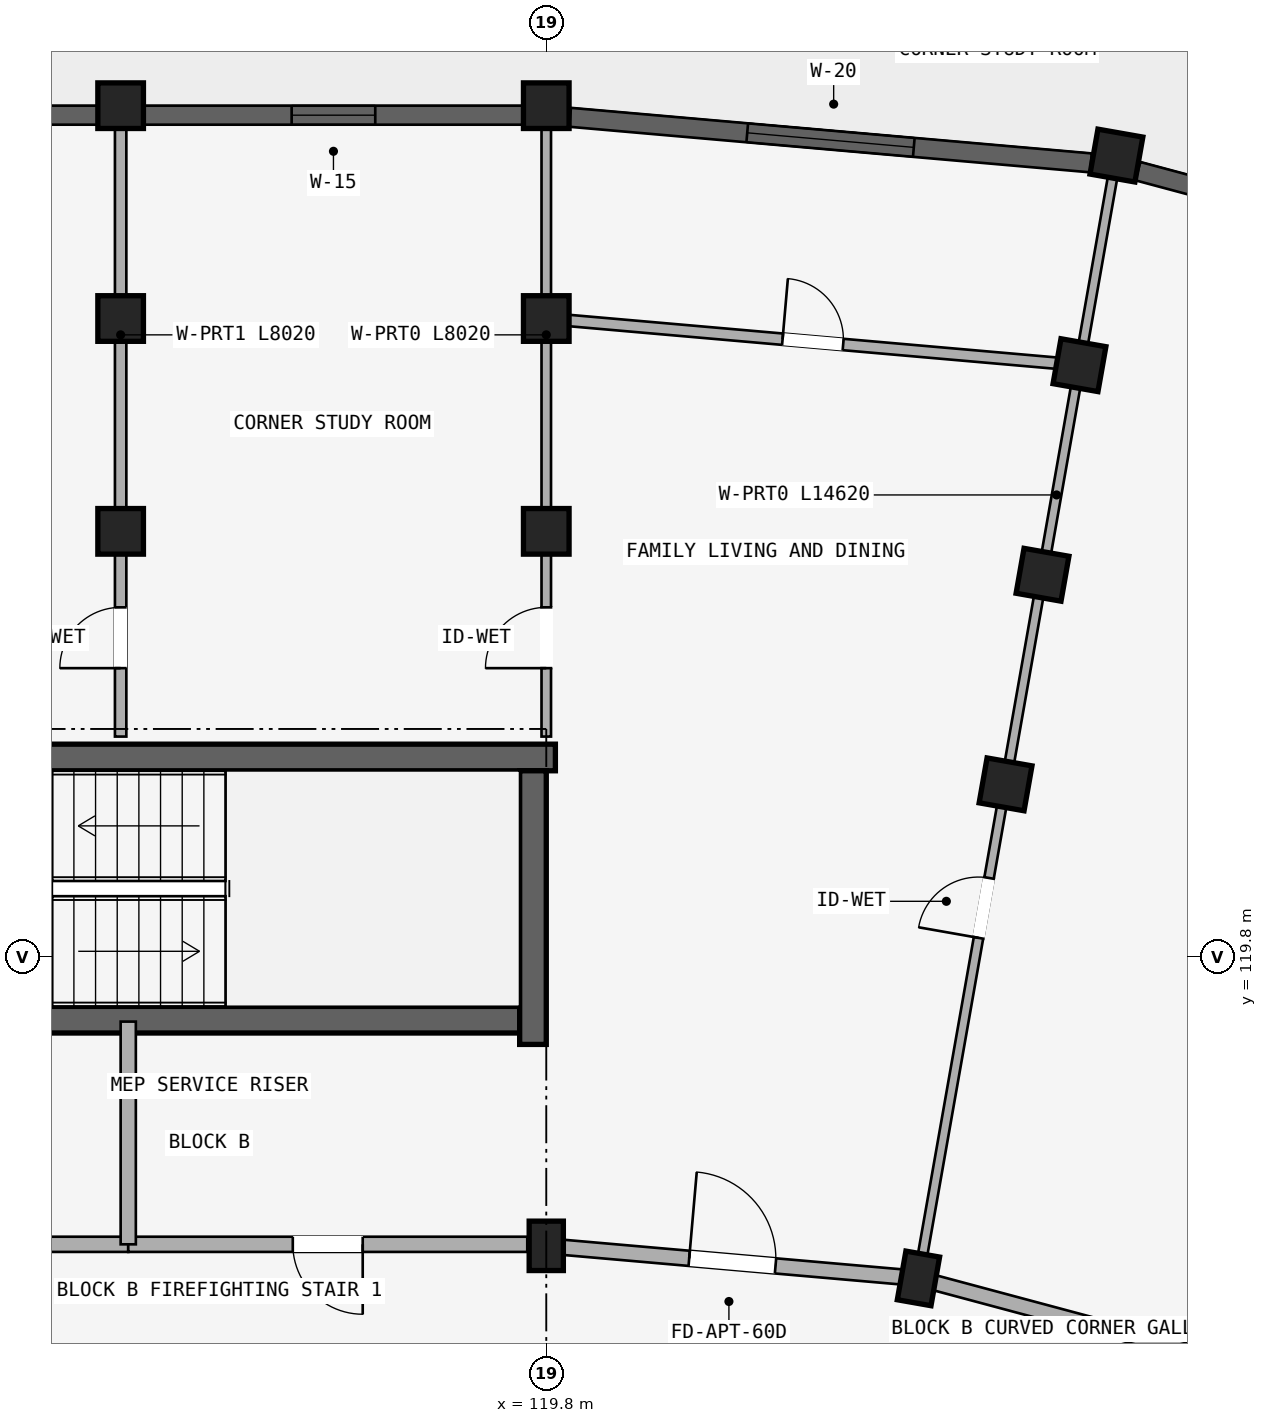
"""IFC4 building model, lengths in metres.
Left out: names, types, materials, properties, quantities, classifications, styles, units other than length and angle.
Written with IfcOpenShell. Run it as: python <this file> out.ifc"""

import sys

from ifc_helpers import new_model, si_unit, direction, frame, frame_2d, origin, origin_2d, place, context, subcontext, project, spatial, rectangle, extrude, element, fill, save


model = new_model("IFC4")
c1 = context("Model", 3, precision=1e-05, world=origin(), true_north=direction((0.0, 1.0)))
c2 = subcontext(c1, "Body", "Model", "MODEL_VIEW")
j1 = project(units=[si_unit("LENGTHUNIT", "METRE"), si_unit("PLANEANGLEUNIT", "RADIAN")], contexts=[c1])
p1 = place(None, origin())
s1 = spatial("IfcSite", under=j1, at=p1, CompositionType="ELEMENT")
p2 = place(p1, origin())
s2 = spatial("IfcBuilding", under=s1, at=p2, CompositionType="ELEMENT")
p3 = place(p2, frame((0.0, 0.0, 30.75)))
s3 = spatial("IfcBuildingStorey", under=s2, at=p3, CompositionType="ELEMENT", Elevation=30.75)
p4 = place(p3, frame((119.92, 122.425, 0.0), z_axis=(0.0, 0.0, 1.0), x_axis=(-1.0, 0.0, 0.0)))
e1 = element("IfcWall", 1, at=p4, inside=s3, PredefinedType="SHEAR", context=c2, shape_type="SweptSolid", body=[
    extrude(rectangle(XDim=8.545, YDim=0.35, at=frame_2d((4.272, 0.0))), origin(), (0.0, 0.0, 1.0), 2.93),
])
p5 = place(p3, frame((119.45, 118.975, 0.0), z_axis=(0.0, 0.0, 1.0), x_axis=(-1.0, 0.0, 0.0)))
e2 = element("IfcWall", 2, at=p5, inside=s3, PredefinedType="SHEAR", context=c2, shape_type="SweptSolid", body=[
    extrude(rectangle(XDim=8.075, YDim=0.35, at=frame_2d((4.038, 0.0))), origin(), (0.0, 0.0, 1.0), 2.93),
])
p6 = place(p5, frame((6.38, 0.0, 0.0)))
e3 = element("IfcOpeningElement", 3, at=p6, cuts=e2, PredefinedType="OPENING", context=c2, shape_type="SweptSolid", body=[
    extrude(rectangle(XDim=1.24, YDim=2.15, at=frame_2d((0.62, 1.075))), frame((0.0, 0.185, 0.0), z_axis=(0.0, -1.0, 0.0), x_axis=(1.0, 0.0, 0.0)), (0.0, 0.0, 1.0), 0.37),
])
p7 = place(p3, frame((119.625, 118.65, 0.0), z_axis=(0.0, 0.0, 1.0), x_axis=(0.0, 1.0, 0.0)))
e4 = element("IfcWall", 4, at=p7, inside=s3, PredefinedType="SHEAR", context=c2, shape_type="SweptSolid", body=[
    extrude(rectangle(XDim=3.6, YDim=0.35, at=frame_2d((1.8, 0.0))), origin(), (0.0, 0.0, 1.0), 2.93),
])
p8 = place(p3, frame((119.8, 116.0, 0.0), z_axis=(0.0, 0.0, 1.0), x_axis=(1.0, 0.0, 0.0)))
e5 = element("IfcColumn", 5, at=p8, inside=s3, PredefinedType="COLUMN", context=c2, shape_type="SweptSolid", body=[
    extrude(rectangle(XDim=0.45, YDim=0.65, at=origin_2d()), origin(), (0.0, 0.0, 1.0), 2.93),
])
for number, where, z_axis, x_axis in (
    (6, (119.8, 125.4, 0.0), (0.0, 0.0, 1.0), (1.0, 0.0, 0.0)),
    (7, (119.8, 128.2, 0.0), (0.0, 0.0, 1.0), (1.0, 0.0, 0.0)),
):
    element("IfcColumn", number, at=place(p3, frame(where, z_axis=z_axis, x_axis=x_axis)), inside=s3, PredefinedType="COLUMN", context=c2, shape_type="SweptSolid", body=[
        extrude(rectangle(XDim=0.6, YDim=0.6, at=origin_2d()), origin(), (0.0, 0.0, 1.0), 2.93),
    ])
p9 = place(p3, frame((119.8, 131.0, 0.0), z_axis=(0.0, 0.0, 1.0), x_axis=(1.0, 0.0, 0.0)))
e8 = element("IfcColumn", 8, at=p9, inside=s3, PredefinedType="COLUMN", context=c2, shape_type="SweptSolid", body=[
    extrude(rectangle(XDim=0.6, YDim=0.6, at=origin_2d()), origin(), (0.0, 0.0, 1.0), 2.97),
])
p10 = place(p3, frame((124.697, 115.572, 0.0), z_axis=(0.0, 0.0, 1.0), x_axis=(-0.984807753012, 0.173648177667, 0.0)))
e9 = element("IfcColumn", 9, at=p10, inside=s3, PredefinedType="COLUMN", context=c2, shape_type="SweptSolid", body=[
    extrude(rectangle(XDim=0.45, YDim=0.65, at=origin_2d()), origin(), (0.0, 0.0, 1.0), 2.93),
])
for number, where, z_axis, x_axis in (
    (10, (125.843, 122.071, 0.0), (0.0, 0.0, 1.0), (-0.985, 0.174, 0.0)),
    (11, (126.329, 124.829, 0.0), (0.0, 0.0, 1.0), (-0.985, 0.174, 0.0)),
    (12, (126.815, 127.586, 0.0), (0.0, 0.0, 1.0), (-0.985, 0.174, 0.0)),
):
    element("IfcColumn", number, at=place(p3, frame(where, z_axis=z_axis, x_axis=x_axis)), inside=s3, PredefinedType="COLUMN", context=c2, shape_type="SweptSolid", body=[
        extrude(rectangle(XDim=0.6, YDim=0.6, at=origin_2d()), origin(), (0.0, 0.0, 1.0), 2.93),
    ])
p11 = place(p3, frame((127.302, 130.344, 0.0), z_axis=(0.0, 0.0, 1.0), x_axis=(-0.984807753012, 0.173648177667, 0.0)))
e13 = element("IfcColumn", 13, at=p11, inside=s3, PredefinedType="COLUMN", context=c2, shape_type="SweptSolid", body=[
    extrude(rectangle(XDim=0.6, YDim=0.6, at=origin_2d()), origin(), (0.0, 0.0, 1.0), 2.97),
])
for number, where, z_axis, x_axis in (
    (14, (114.2, 125.4, 0.0), (0.0, 0.0, 1.0), (1.0, 0.0, 0.0)),
    (15, (114.2, 128.2, 0.0), (0.0, 0.0, 1.0), (1.0, 0.0, 0.0)),
):
    element("IfcColumn", number, at=place(p3, frame(where, z_axis=z_axis, x_axis=x_axis)), inside=s3, PredefinedType="COLUMN", context=c2, shape_type="SweptSolid", body=[
        extrude(rectangle(XDim=0.6, YDim=0.6, at=origin_2d()), origin(), (0.0, 0.0, 1.0), 2.93),
    ])
p12 = place(p3, frame((114.2, 131.0, 0.0), z_axis=(0.0, 0.0, 1.0), x_axis=(1.0, 0.0, 0.0)))
e16 = element("IfcColumn", 16, at=p12, inside=s3, PredefinedType="COLUMN", context=c2, shape_type="SweptSolid", body=[
    extrude(rectangle(XDim=0.6, YDim=0.6, at=origin_2d()), origin(), (0.0, 0.0, 1.0), 2.97),
])
p13 = place(p3, frame((114.3, 116.02, 0.0), z_axis=(0.0, 0.0, 1.0), x_axis=(-1.0, 0.0, 0.0)))
e17 = element("IfcWall", 17, at=p13, inside=s3, PredefinedType="STANDARD", context=c2, shape_type="SweptSolid", body=[
    extrude(rectangle(XDim=5.65, YDim=0.2, at=frame_2d((2.825, 0.0))), origin(), (0.0, 0.0, 1.0), 2.372),
])
p14 = place(p13, frame((1.923, 0.0, 0.0)))
e18 = element("IfcOpeningElement", 18, at=p14, cuts=e17, PredefinedType="OPENING", context=c2, shape_type="SweptSolid", body=[
    extrude(rectangle(XDim=1.24, YDim=2.15, at=frame_2d((0.62, 1.075))), frame((0.0, 0.11, 0.0), z_axis=(0.0, -1.0, 0.0), x_axis=(1.0, 0.0, 0.0)), (0.0, 0.0, 1.0), 0.22),
])
p15 = place(p3, frame((119.55, 116.02, 0.0), z_axis=(0.0, 0.0, 1.0), x_axis=(-1.0, 0.0, 0.0)))
e19 = element("IfcWall", 19, at=p15, inside=s3, PredefinedType="STANDARD", context=c2, shape_type="SweptSolid", body=[
    extrude(rectangle(XDim=5.25, YDim=0.2, at=frame_2d((2.625, 0.0))), origin(), (0.0, 0.0, 1.0), 2.372),
])
p16 = place(p15, frame((2.165, 0.0, 0.0)))
e20 = element("IfcOpeningElement", 20, at=p16, cuts=e19, PredefinedType="OPENING", context=c2, shape_type="SweptSolid", body=[
    extrude(rectangle(XDim=0.92, YDim=2.1, at=frame_2d((0.46, 1.05))), frame((0.0, 0.11, 0.0), z_axis=(0.0, -1.0, 0.0), x_axis=(1.0, 0.0, 0.0)), (0.0, 0.0, 1.0), 0.22),
])
p17 = place(p3, frame((114.3, 116.02, 0.0), z_axis=(0.0, 0.0, 1.0), x_axis=(0.0, 1.0, 0.0)))
e21 = element("IfcWall", 21, at=p17, inside=s3, PredefinedType="STANDARD", context=c2, shape_type="SweptSolid", body=[
    extrude(rectangle(XDim=2.93, YDim=0.2, at=frame_2d((1.465, 0.0))), origin(), (0.0, 0.0, 1.0), 2.372),
])
p18 = place(p3, frame((114.2, 122.7, 0.0), z_axis=(0.0, 0.0, 1.0), x_axis=(0.0, 1.0, 0.0)))
e22 = element("IfcWall", 22, at=p18, inside=s3, PredefinedType="PARTITIONING", context=c2, shape_type="SweptSolid", body=[
    extrude(rectangle(XDim=8.02, YDim=0.15, at=frame_2d((4.01, 0.0))), origin(), (0.0, 0.0, 1.0), 2.372),
])
p19 = place(p18, frame((0.9, 0.0, 0.0)))
e23 = element("IfcOpeningElement", 23, at=p19, cuts=e22, PredefinedType="OPENING", context=c2, shape_type="SweptSolid", body=[
    extrude(rectangle(XDim=0.8, YDim=2.1, at=frame_2d((0.4, 1.05))), frame((0.0, 0.085, 0.0), z_axis=(0.0, -1.0, 0.0), x_axis=(1.0, 0.0, 0.0)), (0.0, 0.0, 1.0), 0.17),
])
p20 = place(p3, frame((119.8, 116.0, 0.0), z_axis=(0.0, 0.0, 1.0), x_axis=(0.996193663584, -0.087167566415, 0.0)))
e24 = element("IfcWall", 24, at=p20, inside=s3, PredefinedType="STANDARD", context=c2, shape_type="SweptSolid", body=[
    extrude(rectangle(XDim=4.916, YDim=0.2, at=frame_2d((2.458, 0.0))), origin(), (0.0, 0.0, 1.0), 2.372),
])
p21 = place(p20, frame((1.888, 0.0, 0.0)))
e25 = element("IfcOpeningElement", 25, at=p21, cuts=e24, PredefinedType="OPENING", context=c2, shape_type="SweptSolid", body=[
    extrude(rectangle(XDim=1.14, YDim=2.15, at=frame_2d((0.57, 1.075))), frame((0.0, 0.11, 0.0), z_axis=(0.0, -1.0, 0.0), x_axis=(1.0, 0.0, 0.0)), (0.0, 0.0, 1.0), 0.22),
])
p22 = place(p3, frame((124.697, 115.572, 0.0), z_axis=(0.0, 0.0, 1.0), x_axis=(0.965930095386, -0.258803112091, 0.0)))
e26 = element("IfcWall", 26, at=p22, inside=s3, PredefinedType="STANDARD", context=c2, shape_type="SweptSolid", body=[
    extrude(rectangle(XDim=4.916, YDim=0.2, at=frame_2d((2.458, 0.0))), origin(), (0.0, 0.0, 1.0), 2.372),
])
p23 = place(p3, frame((119.8, 122.7, 0.0), z_axis=(0.0, 0.0, 1.0), x_axis=(0.0, 1.0, 0.0)))
e27 = element("IfcWall", 27, at=p23, inside=s3, PredefinedType="PARTITIONING", context=c2, shape_type="SweptSolid", body=[
    extrude(rectangle(XDim=8.02, YDim=0.125, at=frame_2d((4.01, 0.0))), origin(), (0.0, 0.0, 1.0), 2.372),
])
p24 = place(p23, frame((0.9, 0.0, 0.0)))
e28 = element("IfcOpeningElement", 28, at=p24, cuts=e27, PredefinedType="OPENING", context=c2, shape_type="SweptSolid", body=[
    extrude(rectangle(XDim=0.8, YDim=2.1, at=frame_2d((0.4, 1.05))), frame((0.0, 0.073, 0.0), z_axis=(0.0, -1.0, 0.0), x_axis=(1.0, 0.0, 0.0)), (0.0, 0.0, 1.0), 0.145),
])
p25 = place(p3, frame((124.714, 115.67, 0.0), z_axis=(0.0, 0.0, 1.0), x_axis=(0.173639577162, 0.984809269474, 0.0)))
e29 = element("IfcWall", 29, at=p25, inside=s3, PredefinedType="PARTITIONING", context=c2, shape_type="SweptSolid", body=[
    extrude(rectangle(XDim=14.62, YDim=0.125, at=frame_2d((7.31, 0.0))), origin(), (0.0, 0.0, 1.0), 2.372),
])
p26 = place(p25, frame((4.449, 0.0, 0.0)))
e30 = element("IfcOpeningElement", 30, at=p26, cuts=e29, PredefinedType="OPENING", context=c2, shape_type="SweptSolid", body=[
    extrude(rectangle(XDim=0.8, YDim=2.1, at=frame_2d((0.4, 1.05))), frame((0.0, 0.073, 0.0), z_axis=(0.0, -1.0, 0.0), x_axis=(1.0, 0.0, 0.0)), (0.0, 0.0, 1.0), 0.145),
])
p27 = place(p3, frame((119.8, 128.2, 0.0), z_axis=(0.0, 0.0, 1.0), x_axis=(0.996194658198, -0.087156198737, 0.0)))
e31 = element("IfcWall", 31, at=p27, inside=s3, PredefinedType="PLUMBINGWALL", context=c2, shape_type="SweptSolid", body=[
    extrude(rectangle(XDim=7.042, YDim=0.15, at=frame_2d((3.521, 0.0))), origin(), (0.0, 0.0, 1.0), 2.372),
])
p28 = place(p27, frame((3.121, 0.0, 0.0)))
e32 = element("IfcOpeningElement", 32, at=p28, cuts=e31, PredefinedType="OPENING", context=c2, shape_type="SweptSolid", body=[
    extrude(rectangle(XDim=0.8, YDim=2.1, at=frame_2d((0.4, 1.05))), frame((0.0, 0.085, 0.0), z_axis=(0.0, -1.0, 0.0), x_axis=(1.0, 0.0, 0.0)), (0.0, 0.0, 1.0), 0.17),
])
p29 = place(p3, frame((120.114, 130.847, 0.0), z_axis=(0.0, 0.0, 1.0), x_axis=(0.996193833065, -0.087165629485, 0.0)))
e33 = element("IfcWall", 33, at=p29, inside=s3, PredefinedType="STANDARD", context=c2, shape_type="SweptSolid", body=[
    extrude(rectangle(XDim=6.879, YDim=0.25, at=frame_2d((3.439, 0.0))), origin(), (0.0, 0.0, 1.0), 2.412),
])
p30 = place(p29, frame((2.34, 0.0, 0.312)))
e34 = element("IfcOpeningElement", 34, at=p30, cuts=e33, PredefinedType="OPENING", context=c2, shape_type="SweptSolid", body=[
    extrude(rectangle(XDim=2.2, YDim=1.9, at=frame_2d((1.1, 0.95))), frame((0.0, 0.135, 0.0), z_axis=(0.0, -1.0, 0.0), x_axis=(1.0, 0.0, 0.0)), (0.0, 0.0, 1.0), 0.27),
])
p31 = place(p3, frame((127.584, 130.139, 0.0), z_axis=(0.0, 0.0, 1.0), x_axis=(0.965921436109, -0.258835428922, 0.0)))
e35 = element("IfcWall", 35, at=p31, inside=s3, PredefinedType="STANDARD", context=c2, shape_type="SweptSolid", body=[
    extrude(rectangle(XDim=6.879, YDim=0.25, at=frame_2d((3.439, 0.0))), origin(), (0.0, 0.0, 1.0), 2.412),
])
p32 = place(p31, frame((4.479, 0.0, 0.462)))
e36 = element("IfcOpeningElement", 36, at=p32, cuts=e35, PredefinedType="OPENING", context=c2, shape_type="SweptSolid", body=[
    extrude(rectangle(XDim=1.2, YDim=1.5, at=frame_2d((0.6, 0.75))), frame((0.0, 0.135, 0.0), z_axis=(0.0, -1.0, 0.0), x_axis=(1.0, 0.0, 0.0)), (0.0, 0.0, 1.0), 0.27),
])
p33 = place(p31, frame((1.748, 0.0, 0.0)))
e37 = element("IfcOpeningElement", 37, at=p33, cuts=e35, PredefinedType="OPENING", context=c2, shape_type="SweptSolid", body=[
    extrude(rectangle(XDim=1.32, YDim=2.15, at=frame_2d((0.66, 1.075))), frame((0.0, 0.135, 0.0), z_axis=(0.0, -1.0, 0.0), x_axis=(1.0, 0.0, 0.0)), (0.0, 0.0, 1.0), 0.27),
])
p34 = place(p3, frame((119.497, 130.875, 0.0), z_axis=(0.0, 0.0, 1.0), x_axis=(-1.0, 0.0, 0.0)))
e38 = element("IfcWall", 38, at=p34, inside=s3, PredefinedType="STANDARD", context=c2, shape_type="SweptSolid", body=[
    extrude(rectangle(XDim=4.993, YDim=0.25, at=frame_2d((2.497, 0.0))), origin(), (0.0, 0.0, 1.0), 2.48),
])
p35 = place(p34, frame((1.947, 0.0, 0.83)))
e39 = element("IfcOpeningElement", 39, at=p35, cuts=e38, PredefinedType="OPENING", context=c2, shape_type="SweptSolid", body=[
    extrude(rectangle(XDim=1.1, YDim=1.45, at=frame_2d((0.55, 0.725))), frame((0.0, 0.135, 0.0), z_axis=(0.0, -1.0, 0.0), x_axis=(1.0, 0.0, 0.0)), (0.0, 0.0, 1.0), 0.27),
])
p36 = place(p3, frame((113.896, 130.875, 0.0), z_axis=(0.0, 0.0, 1.0), x_axis=(-1.0, 0.0, 0.0)))
e40 = element("IfcWall", 40, at=p36, inside=s3, PredefinedType="STANDARD", context=c2, shape_type="SweptSolid", body=[
    extrude(rectangle(XDim=4.993, YDim=0.25, at=frame_2d((2.497, 0.0))), origin(), (0.0, 0.0, 1.0), 2.48),
])
p37 = place(p36, frame((2.021, 0.0, 0.88)))
e41 = element("IfcOpeningElement", 41, at=p37, cuts=e40, PredefinedType="OPENING", context=c2, shape_type="SweptSolid", body=[
    extrude(rectangle(XDim=0.95, YDim=1.35, at=frame_2d((0.475, 0.675))), frame((0.0, 0.135, 0.0), z_axis=(0.0, -1.0, 0.0), x_axis=(1.0, 0.0, 0.0)), (0.0, 0.0, 1.0), 0.27),
])
p38 = place(p30, origin())
e42 = element("IfcWindow", 42, at=p38, inside=s3, PartitioningType="TRIPLE_PANEL_VERTICAL", PredefinedType="WINDOW", context=c2, shape_type="SweptSolid", body=[
    extrude(rectangle(XDim=2.2, YDim=1.9, at=frame_2d((1.1, 0.95))), frame((0.0, 0.03, 0.0), z_axis=(0.0, -1.0, 0.0), x_axis=(1.0, 0.0, 0.0)), (0.0, 0.0, 1.0), 0.06),
])
fill(e34, e42)
p39 = place(p35, origin())
e43 = element("IfcWindow", 43, at=p39, inside=s3, PartitioningType="SINGLE_PANEL", PredefinedType="WINDOW", context=c2, shape_type="SweptSolid", body=[
    extrude(rectangle(XDim=1.1, YDim=1.45, at=frame_2d((0.55, 0.725))), frame((0.0, 0.03, 0.0), z_axis=(0.0, -1.0, 0.0), x_axis=(1.0, 0.0, 0.0)), (0.0, 0.0, 1.0), 0.06),
])
fill(e39, e43)
p40 = place(p16, frame((0.92, 0.0, 0.0), z_axis=(0.0, 0.0, 1.0), x_axis=(-1.0, 0.0, 0.0)))
e44 = element("IfcDoor", 44, at=p40, inside=s3, OperationType="SINGLE_SWING_RIGHT", PredefinedType="DOOR", context=c2, shape_type="SweptSolid", body=[
    extrude(rectangle(XDim=0.92, YDim=2.1, at=frame_2d((0.46, 1.05))), frame((0.0, 0.025, 0.0), z_axis=(0.0, -1.0, 0.0), x_axis=(1.0, 0.0, 0.0)), (0.0, 0.0, 1.0), 0.05),
])
fill(e20, e44)
p41 = place(p19, frame((0.8, 0.0, 0.0), z_axis=(0.0, 0.0, 1.0), x_axis=(-1.0, 0.0, 0.0)))
e45 = element("IfcDoor", 45, at=p41, inside=s3, OperationType="SINGLE_SWING_RIGHT", PredefinedType="DOOR", context=c2, shape_type="SweptSolid", body=[
    extrude(rectangle(XDim=0.8, YDim=2.1, at=frame_2d((0.4, 1.05))), frame((0.0, 0.025, 0.0), z_axis=(0.0, -1.0, 0.0), x_axis=(1.0, 0.0, 0.0)), (0.0, 0.0, 1.0), 0.05),
])
fill(e23, e45)
p42 = place(p24, frame((0.8, 0.0, 0.0), z_axis=(0.0, 0.0, 1.0), x_axis=(-1.0, 0.0, 0.0)))
e46 = element("IfcDoor", 46, at=p42, inside=s3, OperationType="SINGLE_SWING_RIGHT", PredefinedType="DOOR", context=c2, shape_type="SweptSolid", body=[
    extrude(rectangle(XDim=0.8, YDim=2.1, at=frame_2d((0.4, 1.05))), frame((0.0, 0.025, 0.0), z_axis=(0.0, -1.0, 0.0), x_axis=(1.0, 0.0, 0.0)), (0.0, 0.0, 1.0), 0.05),
])
fill(e28, e46)
p43 = place(p26, frame((0.8, 0.0, 0.0), z_axis=(0.0, 0.0, 1.0), x_axis=(-1.0, 0.0, 0.0)))
e47 = element("IfcDoor", 47, at=p43, inside=s3, OperationType="SINGLE_SWING_RIGHT", PredefinedType="DOOR", context=c2, shape_type="SweptSolid", body=[
    extrude(rectangle(XDim=0.8, YDim=2.1, at=frame_2d((0.4, 1.05))), frame((0.0, 0.025, 0.0), z_axis=(0.0, -1.0, 0.0), x_axis=(1.0, 0.0, 0.0)), (0.0, 0.0, 1.0), 0.05),
])
fill(e30, e47)
p44 = place(p21, origin())
e48 = element("IfcDoor", 48, at=p44, inside=s3, OperationType="SINGLE_SWING_LEFT", PredefinedType="DOOR", context=c2, shape_type="SweptSolid", body=[
    extrude(rectangle(XDim=1.14, YDim=2.15, at=frame_2d((0.57, 1.075))), frame((0.0, 0.025, 0.0), z_axis=(0.0, -1.0, 0.0), x_axis=(1.0, 0.0, 0.0)), (0.0, 0.0, 1.0), 0.05),
])
fill(e25, e48)
p45 = place(p28, frame((0.8, 0.0, 0.0), z_axis=(0.0, 0.0, 1.0), x_axis=(-1.0, 0.0, 0.0)))
e49 = element("IfcDoor", 49, at=p45, inside=s3, OperationType="SINGLE_SWING_RIGHT", PredefinedType="DOOR", context=c2, shape_type="SweptSolid", body=[
    extrude(rectangle(XDim=0.8, YDim=2.1, at=frame_2d((0.4, 1.05))), frame((0.0, 0.025, 0.0), z_axis=(0.0, -1.0, 0.0), x_axis=(1.0, 0.0, 0.0)), (0.0, 0.0, 1.0), 0.05),
])
fill(e32, e49)
save(model, sys.argv[1])
